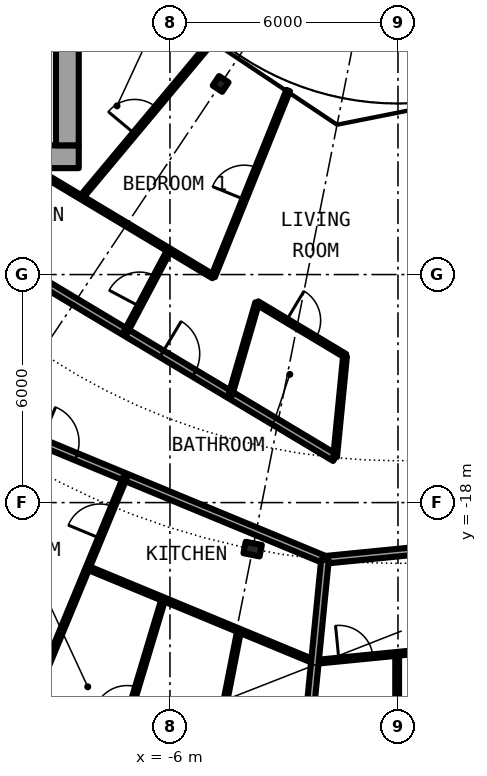
"""IFC4 building model, lengths in metres.
Left out: names, types, materials, properties, quantities, classifications, styles, units other than length and angle.
Written with IfcOpenShell. Run it as: python <this file> out.ifc"""

import sys

from ifc_helpers import new_model, si_unit, direction, frame, frame_2d, origin, origin_2d, place, context, subcontext, project, spatial, rectangle, i_section, extrude, element, fill, save


model = new_model("IFC4")
c1 = context("Model", 3, precision=1e-05, world=origin(), true_north=direction((0.0, 1.0)))
c2 = subcontext(c1, "Body", "Model", "MODEL_VIEW")
j1 = project(units=[si_unit("LENGTHUNIT", "METRE"), si_unit("PLANEANGLEUNIT", "RADIAN")], contexts=[c1])
p1 = place(None, origin())
s1 = spatial("IfcSite", under=j1, at=p1, CompositionType="ELEMENT")
p2 = place(p1, origin())
s2 = spatial("IfcBuilding", under=s1, at=p2, CompositionType="ELEMENT")
p3 = place(p2, frame((0.0, 0.0, 117.75)))
s3 = spatial("IfcBuildingStorey", under=s2, at=p3, CompositionType="ELEMENT", Elevation=117.75)
p4 = place(p3, frame((-3.824, -19.223, 0.0), z_axis=(0.0, 0.0, 1.0), x_axis=(-0.195090322016, -0.980785280403, 0.0)))
e1 = element("IfcColumn", 1, at=p4, inside=s3, PredefinedType="COLUMN", context=c2, shape_type="SweptSolid", body=[
    extrude(i_section(OverallWidth=0.307, OverallDepth=0.432, WebThickness=0.021, FlangeThickness=0.04, FilletRadius=0.027, at=origin_2d()), origin(), (0.0, 0.0, 1.0), 3.05),
])
p5 = place(p3, frame((-4.667, -6.984, 0.0), z_axis=(0.0, 0.0, 1.0), x_axis=(-0.55557023302, -0.831469612303, 0.0)))
e2 = element("IfcColumn", 2, at=p5, inside=s3, PredefinedType="COLUMN", context=c2, shape_type="SweptSolid", body=[
    extrude(i_section(OverallWidth=0.3, OverallDepth=0.3, WebThickness=0.011, FlangeThickness=0.019, FilletRadius=0.027, at=origin_2d()), origin(), (0.0, 0.0, 1.0), 3.05),
])
p6 = place(p3, frame((-22.2, -8.9, 0.0), z_axis=(0.0, 0.0, 1.0), x_axis=(1.0, 0.0, 0.0)))
e3 = element("IfcWall", 3, at=p6, inside=s3, PredefinedType="SHEAR", context=c2, shape_type="SweptSolid", body=[
    extrude(rectangle(XDim=13.8, YDim=0.6, at=frame_2d((6.9, 0.0))), origin(), (0.0, 0.0, 1.0), 3.05),
])
p7 = place(p6, frame((1.125, 0.0, 0.0)))
e4 = element("IfcOpeningElement", 4, at=p7, cuts=e3, PredefinedType="OPENING", context=c2, shape_type="SweptSolid", body=[
    extrude(rectangle(XDim=1.2, YDim=2.3, at=frame_2d((0.6, 1.15))), frame((0.0, 0.31, 0.0), z_axis=(0.0, -1.0, 0.0), x_axis=(1.0, 0.0, 0.0)), (0.0, 0.0, 1.0), 0.62),
])
p8 = place(p3, frame((-8.7, 8.6, 0.0), z_axis=(0.0, 0.0, 1.0), x_axis=(0.0, -1.0, 0.0)))
e5 = element("IfcWall", 5, at=p8, inside=s3, PredefinedType="SHEAR", context=c2, shape_type="SweptSolid", body=[
    extrude(rectangle(XDim=17.2, YDim=0.6, at=frame_2d((8.6, 0.0))), origin(), (0.0, 0.0, 1.0), 3.05),
])
p9 = place(p8, frame((7.4, 0.0, 0.1)))
e6 = element("IfcOpeningElement", 6, at=p9, cuts=e5, PredefinedType="OPENING", context=c2, shape_type="SweptSolid", body=[
    extrude(rectangle(XDim=2.4, YDim=2.2, at=frame_2d((1.2, 1.1))), frame((0.0, 0.31, 0.0), z_axis=(0.0, -1.0, 0.0), x_axis=(1.0, 0.0, 0.0)), (0.0, 0.0, 1.0), 0.62),
])
p10 = place(p3, frame((-2.193, -22.194, 0.0), z_axis=(0.0, 0.0, 1.0), x_axis=(0.995173152282, 0.098134586035, 0.0)))
e7 = element("IfcWall", 7, at=p10, inside=s3, PredefinedType="PARTITIONING", context=c2, shape_type="SweptSolid", body=[
    extrude(rectangle(XDim=4.361, YDim=0.1, at=frame_2d((2.181, 0.0))), origin(), (0.0, 0.0, 1.0), 2.7),
])
p11 = place(p10, frame((0.641, 0.0, 0.0)))
e8 = element("IfcOpeningElement", 8, at=p11, cuts=e7, PredefinedType="OPENING", context=c2, shape_type="SweptSolid", body=[
    extrude(rectangle(XDim=0.9, YDim=2.3, at=frame_2d((0.45, 1.15))), frame((0.0, 0.06, 0.0), z_axis=(0.0, -1.0, 0.0), x_axis=(1.0, 0.0, 0.0)), (0.0, 0.0, 1.0), 0.12),
])
p12 = place(p3, frame((-8.164, -19.716, 0.0), z_axis=(0.0, 0.0, 1.0), x_axis=(0.92387253274, -0.38270033087, 0.0)))
e9 = element("IfcWall", 9, at=p12, inside=s3, PredefinedType="PARTITIONING", context=c2, shape_type="SweptSolid", body=[
    extrude(rectangle(XDim=6.475, YDim=0.1, at=frame_2d((3.238, 0.0))), origin(), (0.0, 0.0, 1.0), 2.7),
])
p13 = place(p3, frame((-1.921, -19.506, 0.0), z_axis=(0.0, 0.0, 1.0), x_axis=(0.995172982325, 0.098136309541, 0.0)))
e10 = element("IfcWall", 10, at=p13, inside=s3, PredefinedType="PARTITIONING", context=c2, shape_type="SweptSolid", body=[
    extrude(rectangle(XDim=7.655, YDim=0.2, at=frame_2d((3.827, 0.0))), origin(), (0.0, 0.0, 1.0), 2.39),
])
p14 = place(p13, frame((2.368, 0.0, 0.0)))
e11 = element("IfcOpeningElement", 11, at=p14, cuts=e10, PredefinedType="OPENING", context=c2, shape_type="SweptSolid", body=[
    extrude(rectangle(XDim=1.0, YDim=2.3, at=frame_2d((0.5, 1.15))), frame((0.0, 0.11, 0.0), z_axis=(0.0, -1.0, 0.0), x_axis=(1.0, 0.0, 0.0)), (0.0, 0.0, 1.0), 0.22),
])
p15 = place(p3, frame((-12.434, -15.151, 0.0), z_axis=(0.0, 0.0, 1.0), x_axis=(0.923888467236, -0.382661861319, 0.0)))
e12 = element("IfcWall", 12, at=p15, inside=s3, PredefinedType="PARTITIONING", context=c2, shape_type="SweptSolid", body=[
    extrude(rectangle(XDim=11.381, YDim=0.2, at=frame_2d((5.691, 0.0))), origin(), (0.0, 0.0, 1.0), 2.7),
])
p16 = place(p15, frame((3.292, 0.0, 0.0)))
e13 = element("IfcOpeningElement", 13, at=p16, cuts=e12, PredefinedType="OPENING", context=c2, shape_type="SweptSolid", body=[
    extrude(rectangle(XDim=1.0, YDim=2.3, at=frame_2d((0.5, 1.15))), frame((0.0, 0.11, 0.0), z_axis=(0.0, -1.0, 0.0), x_axis=(1.0, 0.0, 0.0)), (0.0, 0.0, 1.0), 0.22),
])
p17 = place(p3, frame((-14.051, -9.391, 0.0), z_axis=(0.0, 0.0, 1.0), x_axis=(0.857768591583, -0.514036033069, 0.0)))
e14 = element("IfcWall", 14, at=p17, inside=s3, PredefinedType="PARTITIONING", context=c2, shape_type="SweptSolid", body=[
    extrude(rectangle(XDim=14.45, YDim=0.2, at=frame_2d((7.225, 0.0))), origin(), (0.0, 0.0, 1.0), 2.7),
])
p18 = place(p17, frame((9.133, 0.0, 0.0)))
e15 = element("IfcOpeningElement", 15, at=p18, cuts=e14, PredefinedType="OPENING", context=c2, shape_type="SweptSolid", body=[
    extrude(rectangle(XDim=1.0, YDim=2.3, at=frame_2d((0.5, 1.15))), frame((0.0, 0.11, 0.0), z_axis=(0.0, -1.0, 0.0), x_axis=(1.0, 0.0, 0.0)), (0.0, 0.0, 1.0), 0.22),
])
p19 = place(p3, frame((-9.621, -9.199, 0.0), z_axis=(0.0, 0.0, 1.0), x_axis=(0.857698539053, -0.514152911211, 0.0)))
e16 = element("IfcWall", 16, at=p19, inside=s3, PredefinedType="PARTITIONING", context=c2, shape_type="SweptSolid", body=[
    extrude(rectangle(XDim=5.551, YDim=0.1, at=frame_2d((2.775, 0.0))), origin(), (0.0, 0.0, 1.0), 2.7),
])
p20 = place(p3, frame((-3.702, -12.747, 0.0), z_axis=(0.0, 0.0, 1.0), x_axis=(0.85772440305, -0.514109763001, 0.0)))
e17 = element("IfcWall", 17, at=p20, inside=s3, PredefinedType="PARTITIONING", context=c2, shape_type="SweptSolid", body=[
    extrude(rectangle(XDim=2.698, YDim=0.1, at=frame_2d((1.349, 0.0))), origin(), (0.0, 0.0, 1.0), 2.7),
])
p21 = place(p20, frame((0.894, 0.0, 0.0)))
e18 = element("IfcOpeningElement", 18, at=p21, cuts=e17, PredefinedType="OPENING", context=c2, shape_type="SweptSolid", body=[
    extrude(rectangle(XDim=0.9, YDim=2.3, at=frame_2d((0.45, 1.15))), frame((0.0, 0.06, 0.0), z_axis=(0.0, -1.0, 0.0), x_axis=(1.0, 0.0, 0.0)), (0.0, 0.0, 1.0), 0.12),
])
p22 = place(p3, frame((-10.399, -25.106, 0.0), z_axis=(0.0, 0.0, 1.0), x_axis=(0.382697543868, 0.923873687209, 0.0)))
e19 = element("IfcWall", 19, at=p22, inside=s3, PredefinedType="PARTITIONING", context=c2, shape_type="SweptSolid", body=[
    extrude(rectangle(XDim=8.419, YDim=0.1, at=frame_2d((4.209, 0.0))), origin(), (0.0, 0.0, 1.0), 2.7),
])
p23 = place(p22, frame((6.677, 0.0, 0.0)))
e20 = element("IfcOpeningElement", 20, at=p23, cuts=e19, PredefinedType="OPENING", context=c2, shape_type="SweptSolid", body=[
    extrude(rectangle(XDim=0.9, YDim=2.3, at=frame_2d((0.45, 1.15))), frame((0.0, 0.06, 0.0), z_axis=(0.0, -1.0, 0.0), x_axis=(1.0, 0.0, 0.0)), (0.0, 0.0, 1.0), 0.12),
])
p24 = place(p22, frame((2.468, 0.0, 0.0)))
e21 = element("IfcOpeningElement", 21, at=p24, cuts=e19, PredefinedType="OPENING", context=c2, shape_type="SweptSolid", body=[
    extrude(rectangle(XDim=0.9, YDim=2.3, at=frame_2d((0.45, 1.15))), frame((0.0, 0.06, 0.0), z_axis=(0.0, -1.0, 0.0), x_axis=(1.0, 0.0, 0.0)), (0.0, 0.0, 1.0), 0.12),
])
p25 = place(p3, frame((-8.335, -9.97, 0.0), z_axis=(0.0, 0.0, 1.0), x_axis=(0.641376424834, 0.767226356213, 0.0)))
e22 = element("IfcWall", 22, at=p25, inside=s3, PredefinedType="PARTITIONING", context=c2, shape_type="SweptSolid", body=[
    extrude(rectangle(XDim=5.275, YDim=0.1, at=frame_2d((2.637, 0.0))), origin(), (0.0, 0.0, 1.0), 2.7),
])
p26 = place(p25, frame((2.187, 0.0, 0.0)))
e23 = element("IfcOpeningElement", 23, at=p26, cuts=e22, PredefinedType="OPENING", context=c2, shape_type="SweptSolid", body=[
    extrude(rectangle(XDim=0.9, YDim=2.3, at=frame_2d((0.45, 1.15))), frame((0.0, 0.06, 0.0), z_axis=(0.0, -1.0, 0.0), x_axis=(1.0, 0.0, 0.0)), (0.0, 0.0, 1.0), 0.12),
])
p27 = place(p3, frame((-7.821, -26.025, 0.0), z_axis=(0.0, 0.0, 1.0), x_axis=(0.287793773423, 0.957692405723, 0.0)))
e24 = element("IfcWall", 24, at=p27, inside=s3, PredefinedType="PARTITIONING", context=c2, shape_type="SweptSolid", body=[
    extrude(rectangle(XDim=5.726, YDim=0.1, at=frame_2d((2.863, 0.0))), origin(), (0.0, 0.0, 1.0), 2.7),
])
p28 = place(p27, frame((2.413, 0.0, 0.0)))
e25 = element("IfcOpeningElement", 25, at=p28, cuts=e24, PredefinedType="OPENING", context=c2, shape_type="SweptSolid", body=[
    extrude(rectangle(XDim=0.9, YDim=2.3, at=frame_2d((0.45, 1.15))), frame((0.0, 0.06, 0.0), z_axis=(0.0, -1.0, 0.0), x_axis=(1.0, 0.0, 0.0)), (0.0, 0.0, 1.0), 0.12),
])
p29 = place(p3, frame((-7.166, -13.517, 0.0), z_axis=(0.0, 0.0, 1.0), x_axis=(0.468337293896, 0.883549760425, 0.0)))
e26 = element("IfcWall", 26, at=p29, inside=s3, PredefinedType="PARTITIONING", context=c2, shape_type="SweptSolid", body=[
    extrude(rectangle(XDim=2.445, YDim=0.1, at=frame_2d((1.222, 0.0))), origin(), (0.0, 0.0, 1.0), 2.7),
])
p30 = place(p29, frame((0.772, 0.0, 0.0)))
e27 = element("IfcOpeningElement", 27, at=p30, cuts=e26, PredefinedType="OPENING", context=c2, shape_type="SweptSolid", body=[
    extrude(rectangle(XDim=0.9, YDim=2.3, at=frame_2d((0.45, 1.15))), frame((0.0, 0.06, 0.0), z_axis=(0.0, -1.0, 0.0), x_axis=(1.0, 0.0, 0.0)), (0.0, 0.0, 1.0), 0.12),
])
p31 = place(p3, frame((-5.217, -26.67, 0.0), z_axis=(0.0, 0.0, 1.0), x_axis=(0.192109041462, 0.981373586453, 0.0)))
e28 = element("IfcWall", 28, at=p31, inside=s3, PredefinedType="PARTITIONING", context=c2, shape_type="SweptSolid", body=[
    extrude(rectangle(XDim=5.404, YDim=0.1, at=frame_2d((2.702, 0.0))), origin(), (0.0, 0.0, 1.0), 2.7),
])
p32 = place(p31, frame((2.252, 0.0, 0.0)))
e29 = element("IfcOpeningElement", 29, at=p32, cuts=e28, PredefinedType="OPENING", context=c2, shape_type="SweptSolid", body=[
    extrude(rectangle(XDim=0.9, YDim=2.3, at=frame_2d((0.45, 1.15))), frame((0.0, 0.06, 0.0), z_axis=(0.0, -1.0, 0.0), x_axis=(1.0, 0.0, 0.0)), (0.0, 0.0, 1.0), 0.12),
])
p33 = place(p3, frame((-4.864, -12.051, 0.0), z_axis=(0.0, 0.0, 1.0), x_axis=(0.374372761824, 0.927278294367, 0.0)))
e30 = element("IfcWall", 30, at=p33, inside=s3, PredefinedType="PARTITIONING", context=c2, shape_type="SweptSolid", body=[
    extrude(rectangle(XDim=5.276, YDim=0.1, at=frame_2d((2.638, 0.0))), origin(), (0.0, 0.0, 1.0), 2.7),
])
p34 = place(p33, frame((2.188, 0.0, 0.0)))
e31 = element("IfcOpeningElement", 31, at=p34, cuts=e30, PredefinedType="OPENING", context=c2, shape_type="SweptSolid", body=[
    extrude(rectangle(XDim=0.9, YDim=2.3, at=frame_2d((0.45, 1.15))), frame((0.0, 0.06, 0.0), z_axis=(0.0, -1.0, 0.0), x_axis=(1.0, 0.0, 0.0)), (0.0, 0.0, 1.0), 0.12),
])
p35 = place(p3, frame((-4.411, -15.168, 0.0), z_axis=(0.0, 0.0, 1.0), x_axis=(0.279201466266, 0.960232545395, 0.0)))
e32 = element("IfcWall", 32, at=p35, inside=s3, PredefinedType="PARTITIONING", context=c2, shape_type="SweptSolid", body=[
    extrude(rectangle(XDim=2.524, YDim=0.1, at=frame_2d((1.262, 0.0))), origin(), (0.0, 0.0, 1.0), 2.7),
])
p36 = place(p3, frame((-2.664, -27.044, 0.0), z_axis=(0.0, 0.0, 1.0), x_axis=(0.098115395479, 0.995175044487, 0.0)))
e33 = element("IfcWall", 33, at=p36, inside=s3, PredefinedType="PARTITIONING", context=c2, shape_type="SweptSolid", body=[
    extrude(rectangle(XDim=7.574, YDim=0.2, at=frame_2d((3.787, 0.0))), origin(), (0.0, 0.0, 1.0), 2.7),
])
p37 = place(p3, frame((-0.026, -27.175, 0.0), z_axis=(0.0, 0.0, 1.0), x_axis=(0.00093971673, 0.999999558466, 0.0)))
e34 = element("IfcWall", 34, at=p37, inside=s3, PredefinedType="PARTITIONING", context=c2, shape_type="SweptSolid", body=[
    extrude(rectangle(XDim=5.196, YDim=0.1, at=frame_2d((2.598, 0.0))), origin(), (0.0, 0.0, 1.0), 2.7),
])
p38 = place(p3, frame((-1.394, -14.154, 0.0), z_axis=(0.0, 0.0, 1.0), x_axis=(-0.097901702875, -0.995196089509, 0.0)))
e35 = element("IfcWall", 35, at=p38, inside=s3, PredefinedType="PARTITIONING", context=c2, shape_type="SweptSolid", body=[
    extrude(rectangle(XDim=2.656, YDim=0.1, at=frame_2d((1.328, 0.0))), origin(), (0.0, 0.0, 1.0), 2.7),
])
p39 = place(p16, origin())
e36 = element("IfcDoor", 36, at=p39, inside=s3, OperationType="SINGLE_SWING_LEFT", PredefinedType="DOOR", context=c2, shape_type="SweptSolid", body=[
    extrude(rectangle(XDim=1.0, YDim=2.3, at=frame_2d((0.5, 1.15))), frame((0.0, 0.025, 0.0), z_axis=(0.0, -1.0, 0.0), x_axis=(1.0, 0.0, 0.0)), (0.0, 0.0, 1.0), 0.05),
])
fill(e13, e36)
p40 = place(p23, origin())
e37 = element("IfcDoor", 37, at=p40, inside=s3, OperationType="SINGLE_SWING_RIGHT", PredefinedType="DOOR", context=c2, shape_type="SweptSolid", body=[
    extrude(rectangle(XDim=0.9, YDim=2.3, at=frame_2d((0.45, 1.15))), frame((0.0, 0.025, 0.0), z_axis=(0.0, -1.0, 0.0), x_axis=(1.0, 0.0, 0.0)), (0.0, 0.0, 1.0), 0.05),
])
fill(e20, e37)
p41 = place(p24, origin())
e38 = element("IfcDoor", 38, at=p41, inside=s3, OperationType="SINGLE_SWING_LEFT", PredefinedType="DOOR", context=c2, shape_type="SweptSolid", body=[
    extrude(rectangle(XDim=0.9, YDim=2.3, at=frame_2d((0.45, 1.15))), frame((0.0, 0.025, 0.0), z_axis=(0.0, -1.0, 0.0), x_axis=(1.0, 0.0, 0.0)), (0.0, 0.0, 1.0), 0.05),
])
fill(e21, e38)
p42 = place(p28, origin())
e39 = element("IfcDoor", 39, at=p42, inside=s3, OperationType="SINGLE_SWING_LEFT", PredefinedType="DOOR", context=c2, shape_type="SweptSolid", body=[
    extrude(rectangle(XDim=0.9, YDim=2.3, at=frame_2d((0.45, 1.15))), frame((0.0, 0.025, 0.0), z_axis=(0.0, -1.0, 0.0), x_axis=(1.0, 0.0, 0.0)), (0.0, 0.0, 1.0), 0.05),
])
fill(e25, e39)
p43 = place(p11, origin())
e40 = element("IfcDoor", 40, at=p43, inside=s3, OperationType="SINGLE_SWING_LEFT", PredefinedType="DOOR", context=c2, shape_type="SweptSolid", body=[
    extrude(rectangle(XDim=0.9, YDim=2.3, at=frame_2d((0.45, 1.15))), frame((0.0, 0.025, 0.0), z_axis=(0.0, -1.0, 0.0), x_axis=(1.0, 0.0, 0.0)), (0.0, 0.0, 1.0), 0.05),
])
fill(e8, e40)
p44 = place(p18, origin())
e41 = element("IfcDoor", 41, at=p44, inside=s3, OperationType="SINGLE_SWING_RIGHT", PredefinedType="DOOR", context=c2, shape_type="SweptSolid", body=[
    extrude(rectangle(XDim=1.0, YDim=2.3, at=frame_2d((0.5, 1.15))), frame((0.0, 0.025, 0.0), z_axis=(0.0, -1.0, 0.0), x_axis=(1.0, 0.0, 0.0)), (0.0, 0.0, 1.0), 0.05),
])
fill(e15, e41)
p45 = place(p21, origin())
e42 = element("IfcDoor", 42, at=p45, inside=s3, OperationType="SINGLE_SWING_LEFT", PredefinedType="DOOR", context=c2, shape_type="SweptSolid", body=[
    extrude(rectangle(XDim=0.9, YDim=2.3, at=frame_2d((0.45, 1.15))), frame((0.0, 0.025, 0.0), z_axis=(0.0, -1.0, 0.0), x_axis=(1.0, 0.0, 0.0)), (0.0, 0.0, 1.0), 0.05),
])
fill(e18, e42)
p46 = place(p30, origin())
e43 = element("IfcDoor", 43, at=p46, inside=s3, OperationType="SINGLE_SWING_LEFT", PredefinedType="DOOR", context=c2, shape_type="SweptSolid", body=[
    extrude(rectangle(XDim=0.9, YDim=2.3, at=frame_2d((0.45, 1.15))), frame((0.0, 0.025, 0.0), z_axis=(0.0, -1.0, 0.0), x_axis=(1.0, 0.0, 0.0)), (0.0, 0.0, 1.0), 0.05),
])
fill(e27, e43)
p47 = place(p34, origin())
e44 = element("IfcDoor", 44, at=p47, inside=s3, OperationType="SINGLE_SWING_RIGHT", PredefinedType="DOOR", context=c2, shape_type="SweptSolid", body=[
    extrude(rectangle(XDim=0.9, YDim=2.3, at=frame_2d((0.45, 1.15))), frame((0.0, 0.025, 0.0), z_axis=(0.0, -1.0, 0.0), x_axis=(1.0, 0.0, 0.0)), (0.0, 0.0, 1.0), 0.05),
])
fill(e31, e44)
p48 = place(p26, origin())
e45 = element("IfcDoor", 45, at=p48, inside=s3, OperationType="SINGLE_SWING_RIGHT", PredefinedType="DOOR", context=c2, shape_type="SweptSolid", body=[
    extrude(rectangle(XDim=0.9, YDim=2.3, at=frame_2d((0.45, 1.15))), frame((0.0, 0.025, 0.0), z_axis=(0.0, -1.0, 0.0), x_axis=(1.0, 0.0, 0.0)), (0.0, 0.0, 1.0), 0.05),
])
fill(e23, e45)
save(model, sys.argv[1])
